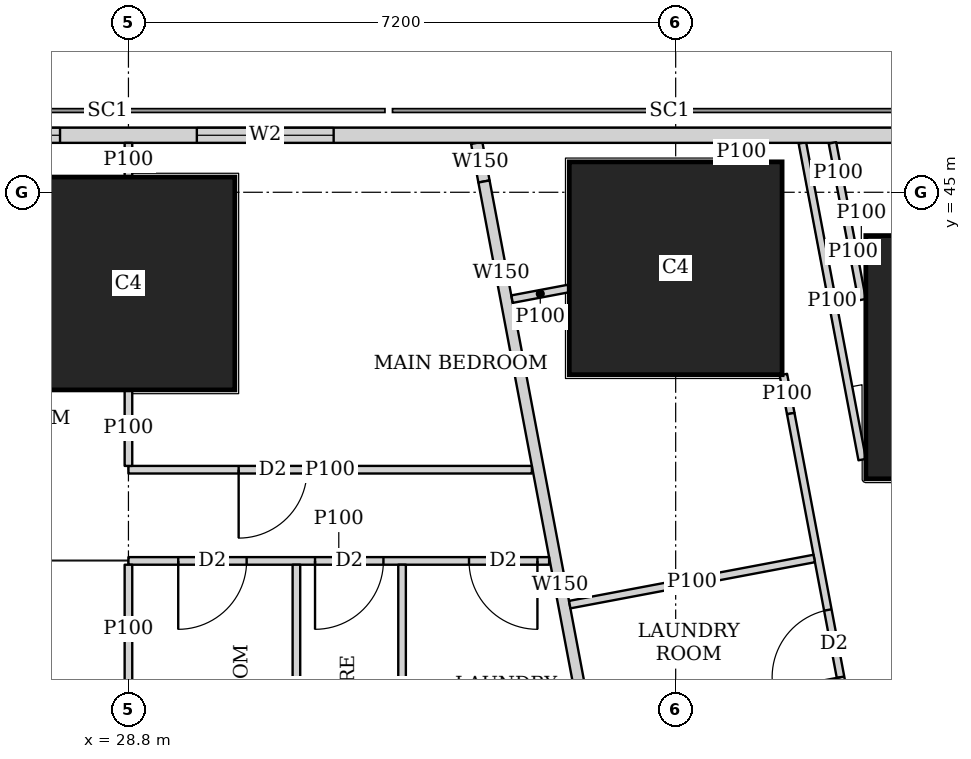
"""IFC4 building model, lengths in metres.
Left out: names, types, materials, properties, quantities, classifications, styles, units other than length and angle.
Written with IfcOpenShell. Run it as: python <this file> out.ifc"""

import sys

from ifc_helpers import new_model, si_unit, direction, frame, frame_2d, origin, origin_2d, place, context, subcontext, project, spatial, rectangle, extrude, element, fill, save


model = new_model("IFC4")
c1 = context("Model", 3, precision=1e-05, world=origin(), true_north=direction((0.0, 1.0)))
c2 = subcontext(c1, "Body", "Model", "MODEL_VIEW")
j1 = project(units=[si_unit("LENGTHUNIT", "METRE"), si_unit("PLANEANGLEUNIT", "RADIAN")], contexts=[c1])
p1 = place(None, origin())
s1 = spatial("IfcSite", under=j1, at=p1, CompositionType="ELEMENT")
p2 = place(p1, origin())
s2 = spatial("IfcBuilding", under=s1, at=p2, CompositionType="ELEMENT")
p3 = place(p2, frame((0.0, 0.0, 31.25)))
s3 = spatial("IfcBuildingStorey", under=s2, at=p3, CompositionType="ELEMENT", Elevation=31.25)
p4 = place(p3, frame((40.102, 42.83, 0.0), z_axis=(0.0, 0.0, 1.0), x_axis=(1.0, 0.0, 0.0)))
e1 = element("IfcColumn", 1, at=p4, inside=s3, PredefinedType="COLUMN", context=c2, shape_type="SweptSolid", body=[
    extrude(rectangle(XDim=3.2, YDim=3.2, at=origin_2d()), origin(), (0.0, 0.0, 1.0), 3.75),
])
for number, where, z_axis, x_axis in (
    (2, (28.8, 43.8, 0.0), (0.0, 0.0, 1.0), (1.0, 0.0, 0.0)),
    (3, (36.0, 44.0, 0.0), (0.0, 0.0, 1.0), (1.0, 0.0, 0.0)),
):
    element("IfcColumn", number, at=place(p3, frame(where, z_axis=z_axis, x_axis=x_axis)), inside=s3, PredefinedType="COLUMN", context=c2, shape_type="SweptSolid", body=[
        extrude(rectangle(XDim=2.8, YDim=2.8, at=origin_2d()), origin(), (0.0, 0.0, 1.0), 3.75),
    ])
p5 = place(p3, frame((40.106, 45.75, 0.0), z_axis=(0.0, 0.0, 1.0), x_axis=(-1.0, 0.0, 0.0)))
e4 = element("IfcWall", 4, at=p5, inside=s3, PredefinedType="SOLIDWALL", context=c2, shape_type="SweptSolid", body=[
    extrude(rectangle(XDim=37.943, YDim=0.2, at=frame_2d((18.971, 0.0))), origin(), (0.0, 0.0, 1.0), 3.5),
])
p6 = place(p5, frame((8.606, 0.0, 0.9)))
e5 = element("IfcOpeningElement", 5, at=p6, cuts=e4, PredefinedType="OPENING", context=c2, shape_type="SweptSolid", body=[
    extrude(rectangle(XDim=1.8, YDim=1.5, at=frame_2d((0.9, 0.75))), frame((0.0, 0.11, 0.0), z_axis=(0.0, -1.0, 0.0), x_axis=(1.0, 0.0, 0.0)), (0.0, 0.0, 1.0), 0.22),
])
p7 = place(p5, frame((12.206, 0.0, 0.9)))
e6 = element("IfcOpeningElement", 6, at=p7, cuts=e4, PredefinedType="OPENING", context=c2, shape_type="SweptSolid", body=[
    extrude(rectangle(XDim=1.8, YDim=1.5, at=frame_2d((0.9, 0.75))), frame((0.0, 0.11, 0.0), z_axis=(0.0, -1.0, 0.0), x_axis=(1.0, 0.0, 0.0)), (0.0, 0.0, 1.0), 0.22),
])
p8 = place(p5, frame((15.806, 0.0, 0.9)))
e7 = element("IfcOpeningElement", 7, at=p8, cuts=e4, PredefinedType="OPENING", context=c2, shape_type="SweptSolid", body=[
    extrude(rectangle(XDim=1.8, YDim=1.5, at=frame_2d((0.9, 0.75))), frame((0.0, 0.11, 0.0), z_axis=(0.0, -1.0, 0.0), x_axis=(1.0, 0.0, 0.0)), (0.0, 0.0, 1.0), 0.22),
])
p9 = place(p5, frame((19.406, 0.0, 0.9)))
e8 = element("IfcOpeningElement", 8, at=p9, cuts=e4, PredefinedType="OPENING", context=c2, shape_type="SweptSolid", body=[
    extrude(rectangle(XDim=1.8, YDim=1.5, at=frame_2d((0.9, 0.75))), frame((0.0, 0.11, 0.0), z_axis=(0.0, -1.0, 0.0), x_axis=(1.0, 0.0, 0.0)), (0.0, 0.0, 1.0), 0.22),
])
p10 = place(p5, frame((23.006, 0.0, 0.9)))
e9 = element("IfcOpeningElement", 9, at=p10, cuts=e4, PredefinedType="OPENING", context=c2, shape_type="SweptSolid", body=[
    extrude(rectangle(XDim=1.8, YDim=1.5, at=frame_2d((0.9, 0.75))), frame((0.0, 0.11, 0.0), z_axis=(0.0, -1.0, 0.0), x_axis=(1.0, 0.0, 0.0)), (0.0, 0.0, 1.0), 0.22),
])
p11 = place(p5, frame((26.606, 0.0, 0.9)))
e10 = element("IfcOpeningElement", 10, at=p11, cuts=e4, PredefinedType="OPENING", context=c2, shape_type="SweptSolid", body=[
    extrude(rectangle(XDim=1.8, YDim=1.5, at=frame_2d((0.9, 0.75))), frame((0.0, 0.11, 0.0), z_axis=(0.0, -1.0, 0.0), x_axis=(1.0, 0.0, 0.0)), (0.0, 0.0, 1.0), 0.22),
])
p12 = place(p3, frame((33.382, 45.65, 0.0), z_axis=(0.0, 0.0, 1.0), x_axis=(0.185657456326, -0.982614527122, 0.0)))
e11 = element("IfcWall", 11, at=p12, inside=s3, PredefinedType="SOLIDWALL", context=c2, shape_type="SweptSolid", body=[
    extrude(rectangle(XDim=0.517, YDim=0.15, at=frame_2d((0.258, 0.0))), origin(), (0.0, 0.0, 1.0), 3.5),
])
p13 = place(p3, frame((33.478, 45.142, 0.0), z_axis=(0.0, 0.0, 1.0), x_axis=(0.185393362436, -0.982664388876, 0.0)))
e12 = element("IfcWall", 12, at=p13, inside=s3, PredefinedType="SOLIDWALL", context=c2, shape_type="SweptSolid", body=[
    extrude(rectangle(XDim=2.455, YDim=0.15, at=frame_2d((1.227, 0.0))), origin(), (0.0, 0.0, 1.0), 2.05),
])
p14 = place(p3, frame((33.933, 42.73, 0.0), z_axis=(0.0, 0.0, 1.0), x_axis=(0.185617897238, -0.982622000682, 0.0)))
e13 = element("IfcWall", 13, at=p14, inside=s3, PredefinedType="SOLIDWALL", context=c2, shape_type="SweptSolid", body=[
    extrude(rectangle(XDim=5.887, YDim=0.15, at=frame_2d((2.944, 0.0))), origin(), (0.0, 0.0, 1.0), 3.5),
])
p15 = place(p3, frame((38.454, 41.483, 0.0), z_axis=(0.0, 0.0, 1.0), x_axis=(-0.185609245326, 0.982623634994, 0.0)))
e14 = element("IfcWall", 14, at=p15, inside=s3, PredefinedType="PARTITIONING", context=c2, shape_type="SweptSolid", body=[
    extrude(rectangle(XDim=4.241, YDim=0.1, at=frame_2d((2.12, 0.0))), origin(), (0.0, 0.0, 1.0), 2.05),
])
p16 = place(p3, frame((38.063, 45.65, 0.0), z_axis=(0.0, 0.0, 1.0), x_axis=(0.186109918919, -0.982528929895, 0.0)))
e15 = element("IfcWall", 15, at=p16, inside=s3, PredefinedType="PARTITIONING", context=c2, shape_type="SweptSolid", body=[
    extrude(rectangle(XDim=0.817, YDim=0.1, at=frame_2d((0.409, 0.0))), origin(), (0.0, 0.0, 1.0), 3.5),
])
p17 = place(p3, frame((38.215, 44.847, 0.0), z_axis=(0.0, 0.0, 1.0), x_axis=(0.185449486507, -0.982653798626, 0.0)))
e16 = element("IfcWall", 16, at=p17, inside=s3, PredefinedType="PARTITIONING", context=c2, shape_type="SweptSolid", body=[
    extrude(rectangle(XDim=1.282, YDim=0.1, at=frame_2d((0.641, 0.0))), origin(), (0.0, 0.0, 1.0), 2.05),
])
p18 = place(p3, frame((36.842, 45.65, 0.0), z_axis=(0.0, 0.0, 1.0), x_axis=(0.183986661451, -0.982928740249, 0.0)))
e17 = element("IfcWall", 17, at=p18, inside=s3, PredefinedType="PARTITIONING", context=c2, shape_type="SweptSolid", body=[
    extrude(rectangle(XDim=0.244, YDim=0.1, at=frame_2d((0.122, 0.0))), origin(), (0.0, 0.0, 1.0), 3.5),
])
p19 = place(p3, frame((37.417, 42.602, 0.0), z_axis=(0.0, 0.0, 1.0), x_axis=(0.185672001976, -0.982611778721, 0.0)))
e18 = element("IfcWall", 18, at=p19, inside=s3, PredefinedType="PARTITIONING", context=c2, shape_type="SweptSolid", body=[
    extrude(rectangle(XDim=0.522, YDim=0.1, at=frame_2d((0.261, 0.0))), origin(), (0.0, 0.0, 1.0), 2.05),
])
p20 = place(p3, frame((37.514, 42.089, 0.0), z_axis=(0.0, 0.0, 1.0), x_axis=(0.185543450498, -0.982636060796, 0.0)))
e19 = element("IfcWall", 19, at=p20, inside=s3, PredefinedType="PARTITIONING", context=c2, shape_type="SweptSolid", body=[
    extrude(rectangle(XDim=9.513, YDim=0.1, at=frame_2d((4.757, 0.0))), origin(), (0.0, 0.0, 1.0), 3.5),
])
p21 = place(p20, frame((8.008, 0.0, 0.0)))
e20 = element("IfcOpeningElement", 20, at=p21, cuts=e19, PredefinedType="OPENING", context=c2, shape_type="SweptSolid", body=[
    extrude(rectangle(XDim=0.9, YDim=2.1, at=frame_2d((0.45, 1.05))), frame((0.0, 0.06, 0.0), z_axis=(0.0, -1.0, 0.0), x_axis=(1.0, 0.0, 0.0)), (0.0, 0.0, 1.0), 0.12),
])
p22 = place(p20, frame((2.63, 0.0, 0.0)))
e21 = element("IfcOpeningElement", 21, at=p22, cuts=e19, PredefinedType="OPENING", context=c2, shape_type="SweptSolid", body=[
    extrude(rectangle(XDim=0.9, YDim=2.1, at=frame_2d((0.45, 1.05))), frame((0.0, 0.06, 0.0), z_axis=(0.0, -1.0, 0.0), x_axis=(1.0, 0.0, 0.0)), (0.0, 0.0, 1.0), 0.12),
])
p23 = place(p20, frame((5.341, 0.0, 0.0)))
e22 = element("IfcOpeningElement", 22, at=p23, cuts=e19, PredefinedType="OPENING", context=c2, shape_type="SweptSolid", body=[
    extrude(rectangle(XDim=0.9, YDim=2.1, at=frame_2d((0.45, 1.05))), frame((0.0, 0.06, 0.0), z_axis=(0.0, -1.0, 0.0), x_axis=(1.0, 0.0, 0.0)), (0.0, 0.0, 1.0), 0.12),
])
p24 = place(p3, frame((38.492, 44.193, 0.0), z_axis=(0.0, 0.0, 1.0), x_axis=(-0.981954528773, -0.189117168504, 0.0)))
e23 = element("IfcWall", 23, at=p24, inside=s3, PredefinedType="PARTITIONING", context=c2, shape_type="SweptSolid", body=[
    extrude(rectangle(XDim=0.101, YDim=0.1, at=frame_2d((0.05, 0.0))), origin(), (0.0, 0.0, 1.0), 2.05),
])
p25 = place(p3, frame((34.59, 43.734, 0.0), z_axis=(0.0, 0.0, 1.0), x_axis=(-0.98274036184, -0.184990219229, 0.0)))
e24 = element("IfcWall", 24, at=p25, inside=s3, PredefinedType="PARTITIONING", context=c2, shape_type="SweptSolid", body=[
    extrude(rectangle(XDim=0.756, YDim=0.1, at=frame_2d((0.378, 0.0))), origin(), (0.0, 0.0, 1.0), 2.05),
])
p26 = place(p3, frame((37.823, 40.182, 0.0), z_axis=(0.0, 0.0, 1.0), x_axis=(-0.982664729897, -0.18539155487, 0.0)))
e25 = element("IfcWall", 25, at=p26, inside=s3, PredefinedType="PARTITIONING", context=c2, shape_type="SweptSolid", body=[
    extrude(rectangle(XDim=3.274, YDim=0.1, at=frame_2d((1.637, 0.0))), origin(), (0.0, 0.0, 1.0), 3.5),
])
p27 = place(p3, frame((28.8, 41.35, 0.0), z_axis=(0.0, 0.0, 1.0), x_axis=(1.0, 0.0, 0.0)))
e26 = element("IfcWall", 26, at=p27, inside=s3, PredefinedType="PARTITIONING", context=c2, shape_type="SweptSolid", body=[
    extrude(rectangle(XDim=5.308, YDim=0.1, at=frame_2d((2.654, 0.0))), origin(), (0.0, 0.0, 1.0), 3.5),
])
p28 = place(p27, frame((1.45, 0.0, 0.0)))
e27 = element("IfcOpeningElement", 27, at=p28, cuts=e26, PredefinedType="OPENING", context=c2, shape_type="SweptSolid", body=[
    extrude(rectangle(XDim=0.9, YDim=2.1, at=frame_2d((0.45, 1.05))), frame((0.0, 0.06, 0.0), z_axis=(0.0, -1.0, 0.0), x_axis=(1.0, 0.0, 0.0)), (0.0, 0.0, 1.0), 0.12),
])
p29 = place(p3, frame((28.8, 40.15, 0.0), z_axis=(0.0, 0.0, 1.0), x_axis=(1.0, 0.0, 0.0)))
e28 = element("IfcWall", 28, at=p29, inside=s3, PredefinedType="PARTITIONING", context=c2, shape_type="SweptSolid", body=[
    extrude(rectangle(XDim=5.535, YDim=0.1, at=frame_2d((2.768, 0.0))), origin(), (0.0, 0.0, 1.0), 3.5),
])
p30 = place(p29, frame((0.655, 0.0, 0.0)))
e29 = element("IfcOpeningElement", 29, at=p30, cuts=e28, PredefinedType="OPENING", context=c2, shape_type="SweptSolid", body=[
    extrude(rectangle(XDim=0.9, YDim=2.1, at=frame_2d((0.45, 1.05))), frame((0.0, 0.06, 0.0), z_axis=(0.0, -1.0, 0.0), x_axis=(1.0, 0.0, 0.0)), (0.0, 0.0, 1.0), 0.12),
])
p31 = place(p29, frame((4.481, 0.0, 0.0)))
e30 = element("IfcOpeningElement", 30, at=p31, cuts=e28, PredefinedType="OPENING", context=c2, shape_type="SweptSolid", body=[
    extrude(rectangle(XDim=0.9, YDim=2.1, at=frame_2d((0.45, 1.05))), frame((0.0, 0.06, 0.0), z_axis=(0.0, -1.0, 0.0), x_axis=(1.0, 0.0, 0.0)), (0.0, 0.0, 1.0), 0.12),
])
p32 = place(p29, frame((2.455, 0.0, 0.0)))
e31 = element("IfcOpeningElement", 31, at=p32, cuts=e28, PredefinedType="OPENING", context=c2, shape_type="SweptSolid", body=[
    extrude(rectangle(XDim=0.9, YDim=2.1, at=frame_2d((0.45, 1.05))), frame((0.0, 0.06, 0.0), z_axis=(0.0, -1.0, 0.0), x_axis=(1.0, 0.0, 0.0)), (0.0, 0.0, 1.0), 0.12),
])
p33 = place(p3, frame((28.8, 41.4, 0.0), z_axis=(0.0, 0.0, 1.0), x_axis=(0.0, 1.0, 0.0)))
e32 = element("IfcWall", 32, at=p33, inside=s3, PredefinedType="PARTITIONING", context=c2, shape_type="SweptSolid", body=[
    extrude(rectangle(XDim=0.999, YDim=0.1, at=frame_2d((0.5, 0.0))), origin(), (0.0, 0.0, 1.0), 3.5),
])
p34 = place(p3, frame((28.8, 45.201, 0.0), z_axis=(0.0, 0.0, 1.0), x_axis=(0.0, 1.0, 0.0)))
e33 = element("IfcWall", 33, at=p34, inside=s3, PredefinedType="PARTITIONING", context=c2, shape_type="SweptSolid", body=[
    extrude(rectangle(XDim=0.449, YDim=0.1, at=frame_2d((0.225, 0.0))), origin(), (0.0, 0.0, 1.0), 3.5),
])
p35 = place(p3, frame((28.8, 38.401, 0.0), z_axis=(0.0, 0.0, 1.0), x_axis=(0.0, 1.0, 0.0)))
e34 = element("IfcWall", 34, at=p35, inside=s3, PredefinedType="PARTITIONING", context=c2, shape_type="SweptSolid", body=[
    extrude(rectangle(XDim=1.699, YDim=0.1, at=frame_2d((0.85, 0.0))), origin(), (0.0, 0.0, 1.0), 3.5),
])
for number, where, z_axis, x_axis in (
    (35, (32.4, 36.825, 0.0), (0.0, 0.0, 1.0), (0.0, 1.0, 0.0)),
    (36, (31.01, 36.825, 0.0), (0.0, 0.0, 1.0), (0.0, 1.0, 0.0)),
):
    element("IfcWall", number, at=place(p3, frame(where, z_axis=z_axis, x_axis=x_axis)), inside=s3, PredefinedType="PARTITIONING", context=c2, shape_type="SweptSolid", body=[
        extrude(rectangle(XDim=3.275, YDim=0.1, at=frame_2d((1.638, 0.0))), origin(), (0.0, 0.0, 1.0), 3.5),
    ])
p36 = place(p6, origin())
e37 = element("IfcWindow", 37, at=p36, inside=s3, PartitioningType="SINGLE_PANEL", PredefinedType="WINDOW", context=c2, shape_type="SweptSolid", body=[
    extrude(rectangle(XDim=1.8, YDim=1.5, at=frame_2d((0.9, 0.75))), frame((0.0, 0.03, 0.0), z_axis=(0.0, -1.0, 0.0), x_axis=(1.0, 0.0, 0.0)), (0.0, 0.0, 1.0), 0.06),
])
fill(e5, e37)
p37 = place(p7, origin())
e38 = element("IfcWindow", 38, at=p37, inside=s3, PartitioningType="SINGLE_PANEL", PredefinedType="WINDOW", context=c2, shape_type="SweptSolid", body=[
    extrude(rectangle(XDim=1.8, YDim=1.5, at=frame_2d((0.9, 0.75))), frame((0.0, 0.03, 0.0), z_axis=(0.0, -1.0, 0.0), x_axis=(1.0, 0.0, 0.0)), (0.0, 0.0, 1.0), 0.06),
])
fill(e6, e38)
p38 = place(p22, origin())
e39 = element("IfcDoor", 39, at=p38, inside=s3, OperationType="SINGLE_SWING_LEFT", PredefinedType="DOOR", context=c2, shape_type="SweptSolid", body=[
    extrude(rectangle(XDim=0.9, YDim=2.1, at=frame_2d((0.45, 1.05))), frame((0.0, 0.025, 0.0), z_axis=(0.0, -1.0, 0.0), x_axis=(1.0, 0.0, 0.0)), (0.0, 0.0, 1.0), 0.05),
])
fill(e21, e39)
p39 = place(p28, origin())
e40 = element("IfcDoor", 40, at=p39, inside=s3, OperationType="SINGLE_SWING_RIGHT", PredefinedType="DOOR", context=c2, shape_type="SweptSolid", body=[
    extrude(rectangle(XDim=0.9, YDim=2.1, at=frame_2d((0.45, 1.05))), frame((0.0, 0.025, 0.0), z_axis=(0.0, -1.0, 0.0), x_axis=(1.0, 0.0, 0.0)), (0.0, 0.0, 1.0), 0.05),
])
fill(e27, e40)
p40 = place(p30, origin())
e41 = element("IfcDoor", 41, at=p40, inside=s3, OperationType="SINGLE_SWING_RIGHT", PredefinedType="DOOR", context=c2, shape_type="SweptSolid", body=[
    extrude(rectangle(XDim=0.9, YDim=2.1, at=frame_2d((0.45, 1.05))), frame((0.0, 0.025, 0.0), z_axis=(0.0, -1.0, 0.0), x_axis=(1.0, 0.0, 0.0)), (0.0, 0.0, 1.0), 0.05),
])
fill(e29, e41)
p41 = place(p31, origin())
e42 = element("IfcDoor", 42, at=p41, inside=s3, OperationType="SINGLE_SWING_LEFT", PredefinedType="DOOR", context=c2, shape_type="SweptSolid", body=[
    extrude(rectangle(XDim=0.9, YDim=2.1, at=frame_2d((0.45, 1.05))), frame((0.0, 0.025, 0.0), z_axis=(0.0, -1.0, 0.0), x_axis=(1.0, 0.0, 0.0)), (0.0, 0.0, 1.0), 0.05),
])
fill(e30, e42)
p42 = place(p32, origin())
e43 = element("IfcDoor", 43, at=p42, inside=s3, OperationType="SINGLE_SWING_RIGHT", PredefinedType="DOOR", context=c2, shape_type="SweptSolid", body=[
    extrude(rectangle(XDim=0.9, YDim=2.1, at=frame_2d((0.45, 1.05))), frame((0.0, 0.025, 0.0), z_axis=(0.0, -1.0, 0.0), x_axis=(1.0, 0.0, 0.0)), (0.0, 0.0, 1.0), 0.05),
])
fill(e31, e43)
save(model, sys.argv[1])
